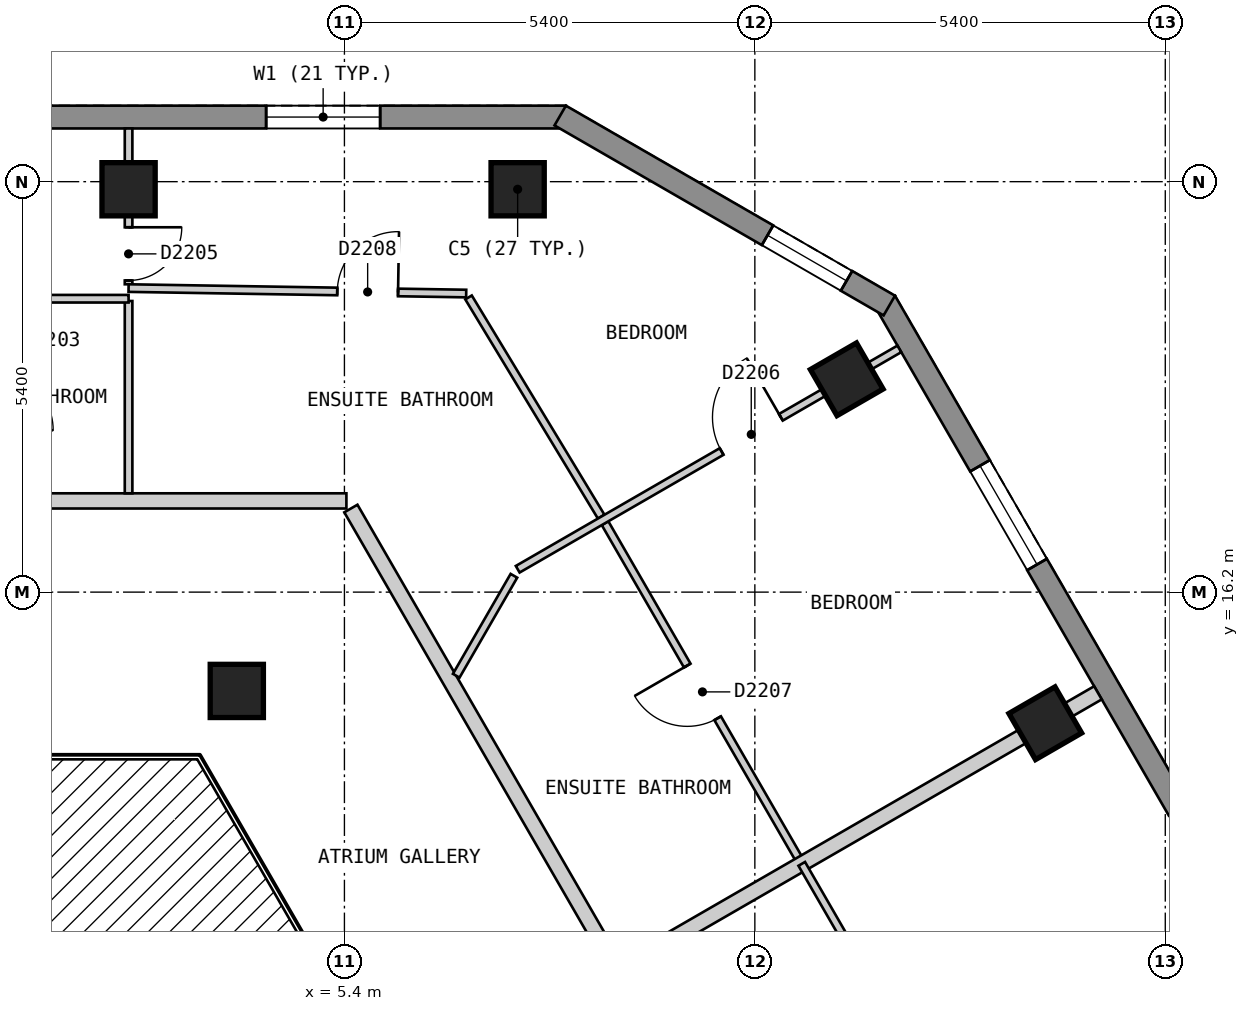
"""IFC4 building model, lengths in metres.
Left out: names, types, materials, properties, quantities, classifications, styles, units other than length and angle.
Written with IfcOpenShell. Run it as: python <this file> out.ifc"""

import sys

from ifc_helpers import new_model, si_unit, direction, frame, frame_2d, origin, origin_2d, place, context, subcontext, project, spatial, polyline, rectangle, outline, extrude, element, fill, save


model = new_model("IFC4")
c1 = context("Model", 3, precision=1e-05, world=origin(), true_north=direction((0.0, 1.0)))
c2 = subcontext(c1, "Body", "Model", "MODEL_VIEW")
j1 = project(units=[si_unit("LENGTHUNIT", "METRE"), si_unit("PLANEANGLEUNIT", "RADIAN")], contexts=[c1])
p1 = place(None, origin())
s1 = spatial("IfcSite", under=j1, at=p1, CompositionType="ELEMENT")
p2 = place(p1, origin())
s2 = spatial("IfcBuilding", under=s1, at=p2, CompositionType="ELEMENT")
p3 = place(p2, frame((0.0, 0.0, 229.8)))
s3 = spatial("IfcBuildingStorey", under=s2, at=p3, CompositionType="ELEMENT", Elevation=229.8)
for number, where, z_axis, x_axis in (
    (1, (7.679, 21.5, 0.0), (0.0, 0.0, 1.0), (-1.0, 0.0, 0.0)),
    (2, (2.56, 21.5, 0.0), (0.0, 0.0, 1.0), (-1.0, 0.0, 0.0)),
    (3, (14.621, 14.475, 0.0), (0.0, 0.0, 1.0), (-0.5, 0.866, 0.0)),
    (4, (12.009, 19.0, 0.0), (0.0, 0.0, 1.0), (-0.5, 0.866, 0.0)),
    (5, (3.984, 14.9, 0.0), (0.0, 0.0, 1.0), (1.0, 0.0, 0.0)),
):
    element("IfcColumn", number, at=place(p3, frame(where, z_axis=z_axis, x_axis=x_axis)), inside=s3, PredefinedType="COLUMN", context=c2, shape_type="SweptSolid", body=[
        extrude(rectangle(XDim=0.7, YDim=0.7, at=origin_2d()), origin(), (0.0, 0.0, 1.0), 3.0),
    ])
p4 = place(p3, frame((8.314, 22.45, 0.0), z_axis=(0.0, 0.0, 1.0), x_axis=(-1.0, 0.0, 0.0)))
e6 = element("IfcWall", 6, at=p4, inside=s3, PredefinedType="SOLIDWALL", context=c2, shape_type="SweptSolid", body=[
    extrude(outline(polyline([(0.0, -0.15), (16.628, -0.15), (16.548, 0.15), (0.08, 0.15), (0.0, -0.15)])), origin(), (0.0, 0.0, 1.0), 2.7),
])
p5 = place(p4, frame((2.444, 0.0, 0.15)))
e7 = element("IfcOpeningElement", 7, at=p5, cuts=e6, PredefinedType="OPENING", context=c2, shape_type="SweptSolid", body=[
    extrude(rectangle(XDim=1.5, YDim=2.1, at=frame_2d((0.75, 1.05))), frame((0.0, 0.16, 0.0), z_axis=(0.0, -1.0, 0.0), x_axis=(1.0, 0.0, 0.0)), (0.0, 0.0, 1.0), 0.32),
])
p6 = place(p4, frame((7.564, 0.0, 0.15)))
e8 = element("IfcOpeningElement", 8, at=p6, cuts=e6, PredefinedType="OPENING", context=c2, shape_type="SweptSolid", body=[
    extrude(rectangle(XDim=1.5, YDim=2.1, at=frame_2d((0.75, 1.05))), frame((0.0, 0.16, 0.0), z_axis=(0.0, -1.0, 0.0), x_axis=(1.0, 0.0, 0.0)), (0.0, 0.0, 1.0), 0.32),
])
p7 = place(p4, frame((12.683, 0.0, 0.15)))
e9 = element("IfcOpeningElement", 9, at=p7, cuts=e6, PredefinedType="OPENING", context=c2, shape_type="SweptSolid", body=[
    extrude(rectangle(XDim=1.5, YDim=2.1, at=frame_2d((0.75, 1.05))), frame((0.0, 0.16, 0.0), z_axis=(0.0, -1.0, 0.0), x_axis=(1.0, 0.0, 0.0)), (0.0, 0.0, 1.0), 0.32),
])
p8 = place(p3, frame((23.599, 0.825, 0.0), z_axis=(0.0, 0.0, 1.0), x_axis=(-0.500003656944, 0.866023292436, 0.0)))
e10 = element("IfcWall", 10, at=p8, inside=s3, PredefinedType="SOLIDWALL", context=c2, shape_type="SweptSolid", body=[
    extrude(outline(polyline([(0.0, -0.15), (22.17, -0.15), (22.09, 0.15), (0.08, 0.15), (0.0, -0.15)])), origin(), (0.0, 0.0, 1.0), 2.7),
])
p9 = place(p8, frame((2.497, 0.0, 0.15)))
e11 = element("IfcOpeningElement", 11, at=p9, cuts=e10, PredefinedType="OPENING", context=c2, shape_type="SweptSolid", body=[
    extrude(rectangle(XDim=1.5, YDim=2.1, at=frame_2d((0.75, 1.05))), frame((0.0, 0.16, 0.0), z_axis=(0.0, -1.0, 0.0), x_axis=(1.0, 0.0, 0.0)), (0.0, 0.0, 1.0), 0.32),
])
p10 = place(p8, frame((7.723, 0.0, 0.15)))
e12 = element("IfcOpeningElement", 12, at=p10, cuts=e10, PredefinedType="OPENING", context=c2, shape_type="SweptSolid", body=[
    extrude(rectangle(XDim=1.5, YDim=2.1, at=frame_2d((0.75, 1.05))), frame((0.0, 0.16, 0.0), z_axis=(0.0, -1.0, 0.0), x_axis=(1.0, 0.0, 0.0)), (0.0, 0.0, 1.0), 0.32),
])
p11 = place(p8, frame((12.948, 0.0, 0.15)))
e13 = element("IfcOpeningElement", 13, at=p11, cuts=e10, PredefinedType="OPENING", context=c2, shape_type="SweptSolid", body=[
    extrude(rectangle(XDim=1.5, YDim=2.1, at=frame_2d((0.75, 1.05))), frame((0.0, 0.16, 0.0), z_axis=(0.0, -1.0, 0.0), x_axis=(1.0, 0.0, 0.0)), (0.0, 0.0, 1.0), 0.32),
])
p12 = place(p8, frame((18.173, 0.0, 0.15)))
e14 = element("IfcOpeningElement", 14, at=p12, cuts=e10, PredefinedType="OPENING", context=c2, shape_type="SweptSolid", body=[
    extrude(rectangle(XDim=1.5, YDim=2.1, at=frame_2d((0.75, 1.05))), frame((0.0, 0.16, 0.0), z_axis=(0.0, -1.0, 0.0), x_axis=(1.0, 0.0, 0.0)), (0.0, 0.0, 1.0), 0.32),
])
p13 = place(p3, frame((12.569, 19.97, 0.0), z_axis=(0.0, 0.0, 1.0), x_axis=(-0.866022959057, 0.500004234368, 0.0)))
e15 = element("IfcWall", 15, at=p13, inside=s3, PredefinedType="SOLIDWALL", context=c2, shape_type="SweptSolid", body=[
    extrude(outline(polyline([(0.0, -0.15), (5.0, -0.15), (4.92, 0.15), (0.08, 0.15), (0.0, -0.15)])), origin(), (0.0, 0.0, 1.0), 2.7),
])
p14 = place(p13, frame((0.65, 0.0, 0.15)))
e16 = element("IfcOpeningElement", 16, at=p14, cuts=e15, PredefinedType="OPENING", context=c2, shape_type="SweptSolid", body=[
    extrude(rectangle(XDim=1.2, YDim=2.1, at=frame_2d((0.6, 1.05))), frame((0.0, 0.16, 0.0), z_axis=(0.0, -1.0, 0.0), x_axis=(1.0, 0.0, 0.0)), (0.0, 0.0, 1.0), 0.32),
])
p15 = place(p3, frame((5.485, 17.3, 0.0), z_axis=(0.0, 0.0, 1.0), x_axis=(0.500017221754, -0.866015460572, 0.0)))
e17 = element("IfcWall", 17, at=p15, inside=s3, PredefinedType="PARTITIONING", context=c2, shape_type="SweptSolid", body=[
    extrude(rectangle(XDim=10.468, YDim=0.2, at=frame_2d((5.234, 0.0))), origin(), (0.0, 0.0, 1.0), 2.7),
])
p16 = place(p15, frame((9.092, 0.0, 0.0)))
e18 = element("IfcOpeningElement", 18, at=p16, cuts=e17, PredefinedType="OPENING", context=c2, shape_type="SweptSolid", body=[
    extrude(rectangle(XDim=1.0, YDim=2.1, at=frame_2d((0.5, 1.05))), frame((0.0, 0.11, 0.0), z_axis=(0.0, -1.0, 0.0), x_axis=(1.0, 0.0, 0.0)), (0.0, 0.0, 1.0), 0.22),
])
p17 = place(p3, frame((-5.311, 17.4, 0.0), z_axis=(0.0, 0.0, 1.0), x_axis=(1.0, 0.0, 0.0)))
e19 = element("IfcWall", 19, at=p17, inside=s3, PredefinedType="PARTITIONING", context=c2, shape_type="SweptSolid", body=[
    extrude(rectangle(XDim=10.737, YDim=0.2, at=frame_2d((5.369, 0.0))), origin(), (0.0, 0.0, 1.0), 2.7),
])
p18 = place(p17, frame((4.812, 0.0, 0.0)))
e20 = element("IfcOpeningElement", 20, at=p18, cuts=e19, PredefinedType="OPENING", context=c2, shape_type="SweptSolid", body=[
    extrude(rectangle(XDim=1.0, YDim=2.1, at=frame_2d((0.5, 1.05))), frame((0.0, 0.11, 0.0), z_axis=(0.0, -1.0, 0.0), x_axis=(1.0, 0.0, 0.0)), (0.0, 0.0, 1.0), 0.22),
])
p19 = place(p3, frame((7.033, 20.077, 0.0), z_axis=(0.0, 0.0, 1.0), x_axis=(0.517730137343, -0.855543981854, 0.0)))
e21 = element("IfcWall", 21, at=p19, inside=s3, PredefinedType="PARTITIONING", context=c2, shape_type="SweptSolid", body=[
    extrude(rectangle(XDim=3.371, YDim=0.1, at=frame_2d((1.685, 0.0))), origin(), (0.0, 0.0, 1.0), 2.7),
])
p20 = place(p3, frame((8.829, 17.107, 0.0), z_axis=(0.0, 0.0, 1.0), x_axis=(0.500035512416, -0.866004899711, 0.0)))
e22 = element("IfcWall", 22, at=p20, inside=s3, PredefinedType="PARTITIONING", context=c2, shape_type="SweptSolid", body=[
    extrude(rectangle(XDim=5.175, YDim=0.1, at=frame_2d((2.588, 0.0))), origin(), (0.0, 0.0, 1.0), 2.7),
])
p21 = place(p20, frame((2.163, 0.0, 0.0)))
e23 = element("IfcOpeningElement", 23, at=p21, cuts=e22, PredefinedType="OPENING", context=c2, shape_type="SweptSolid", body=[
    extrude(rectangle(XDim=0.8, YDim=2.1, at=frame_2d((0.4, 1.05))), frame((0.0, 0.06, 0.0), z_axis=(0.0, -1.0, 0.0), x_axis=(1.0, 0.0, 0.0)), (0.0, 0.0, 1.0), 0.12),
])
p22 = place(p3, frame((2.56, 22.3, 0.0), z_axis=(0.0, 0.0, 1.0), x_axis=(0.0, -1.0, 0.0)))
e24 = element("IfcWall", 24, at=p22, inside=s3, PredefinedType="PARTITIONING", context=c2, shape_type="SweptSolid", body=[
    extrude(rectangle(XDim=2.05, YDim=0.1, at=frame_2d((1.025, 0.0))), origin(), (0.0, 0.0, 1.0), 2.7),
])
p23 = place(p22, frame((1.3, 0.0, 0.0)))
e25 = element("IfcOpeningElement", 25, at=p23, cuts=e24, PredefinedType="OPENING", context=c2, shape_type="SweptSolid", body=[
    extrude(rectangle(XDim=0.7, YDim=2.1, at=frame_2d((0.35, 1.05))), frame((0.0, 0.06, 0.0), z_axis=(0.0, -1.0, 0.0), x_axis=(1.0, 0.0, 0.0)), (0.0, 0.0, 1.0), 0.12),
])
p24 = place(p3, frame((2.56, 20.03, 0.0), z_axis=(0.0, 0.0, 1.0), x_axis=(0.0, -1.0, 0.0)))
e26 = element("IfcWall", 26, at=p24, inside=s3, PredefinedType="PARTITIONING", context=c2, shape_type="SweptSolid", body=[
    extrude(rectangle(XDim=2.53, YDim=0.1, at=frame_2d((1.265, 0.0))), origin(), (0.0, 0.0, 1.0), 2.7),
])
p25 = place(p3, frame((2.56, 20.2, 0.0), z_axis=(0.0, 0.0, 1.0), x_axis=(0.999868576801, -0.016212005615, 0.0)))
e27 = element("IfcWall", 27, at=p25, inside=s3, PredefinedType="PARTITIONING", context=c2, shape_type="SweptSolid", body=[
    extrude(rectangle(XDim=4.442, YDim=0.1, at=frame_2d((2.221, 0.0))), origin(), (0.0, 0.0, 1.0), 2.7),
])
p26 = place(p25, frame((2.746, 0.0, 0.0)))
e28 = element("IfcOpeningElement", 28, at=p26, cuts=e27, PredefinedType="OPENING", context=c2, shape_type="SweptSolid", body=[
    extrude(rectangle(XDim=0.8, YDim=2.1, at=frame_2d((0.4, 1.05))), frame((0.0, 0.06, 0.0), z_axis=(0.0, -1.0, 0.0), x_axis=(1.0, 0.0, 0.0)), (0.0, 0.0, 1.0), 0.12),
])
p27 = place(p3, frame((-0.716, 20.06, 0.0), z_axis=(0.0, 0.0, 1.0), x_axis=(1.0, 0.0, 0.0)))
e29 = element("IfcWall", 29, at=p27, inside=s3, PredefinedType="PARTITIONING", context=c2, shape_type="SweptSolid", body=[
    extrude(rectangle(XDim=3.276, YDim=0.1, at=frame_2d((1.638, 0.0))), origin(), (0.0, 0.0, 1.0), 2.7),
])
p28 = place(p3, frame((6.871, 15.1, 0.0), z_axis=(0.0, 0.0, 1.0), x_axis=(0.499805980977, 0.866137391745, 0.0)))
e30 = element("IfcWall", 30, at=p28, inside=s3, PredefinedType="PARTITIONING", context=c2, shape_type="SweptSolid", body=[
    extrude(rectangle(XDim=1.518, YDim=0.1, at=frame_2d((0.759, 0.0))), origin(), (0.0, 0.0, 1.0), 2.7),
])
p29 = place(p3, frame((7.68, 16.501, 0.0), z_axis=(0.0, 0.0, 1.0), x_axis=(0.86602149507, 0.500006770031, 0.0)))
e31 = element("IfcWall", 31, at=p29, inside=s3, PredefinedType="PARTITIONING", context=c2, shape_type="SweptSolid", body=[
    extrude(rectangle(XDim=5.798, YDim=0.1, at=frame_2d((2.899, 0.0))), origin(), (0.0, 0.0, 1.0), 2.7),
])
p30 = place(p29, frame((3.098, 0.0, 0.0)))
e32 = element("IfcOpeningElement", 32, at=p30, cuts=e31, PredefinedType="OPENING", context=c2, shape_type="SweptSolid", body=[
    extrude(rectangle(XDim=0.9, YDim=2.1, at=frame_2d((0.45, 1.05))), frame((0.0, 0.06, 0.0), z_axis=(0.0, -1.0, 0.0), x_axis=(1.0, 0.0, 0.0)), (0.0, 0.0, 1.0), 0.12),
])
p31 = place(p3, frame((9.079, 11.275, 0.0), z_axis=(0.0, 0.0, 1.0), x_axis=(0.866001485781, 0.500041424909, 0.0)))
e33 = element("IfcWall", 33, at=p31, inside=s3, PredefinedType="PARTITIONING", context=c2, shape_type="SweptSolid", body=[
    extrude(rectangle(XDim=7.2, YDim=0.2, at=frame_2d((3.6, 0.0))), origin(), (0.0, 0.0, 1.0), 2.7),
])
p32 = place(p3, frame((11.417, 12.625, 0.0), z_axis=(0.0, 0.0, 1.0), x_axis=(0.500055103712, -0.865993587304, 0.0)))
e34 = element("IfcWall", 34, at=p32, inside=s3, PredefinedType="PARTITIONING", context=c2, shape_type="SweptSolid", body=[
    extrude(rectangle(XDim=2.944, YDim=0.1, at=frame_2d((1.472, 0.0))), origin(), (0.0, 0.0, 1.0), 2.7),
])
p33 = place(p5, origin())
e35 = element("IfcWindow", 35, at=p33, inside=s3, PartitioningType="SINGLE_PANEL", PredefinedType="WINDOW", context=c2, shape_type="SweptSolid", body=[
    extrude(rectangle(XDim=1.5, YDim=2.1, at=frame_2d((0.75, 1.05))), frame((0.0, 0.03, 0.0), z_axis=(0.0, -1.0, 0.0), x_axis=(1.0, 0.0, 0.0)), (0.0, 0.0, 1.0), 0.06),
])
fill(e7, e35)
p34 = place(p12, origin())
e36 = element("IfcWindow", 36, at=p34, inside=s3, PartitioningType="SINGLE_PANEL", PredefinedType="WINDOW", context=c2, shape_type="SweptSolid", body=[
    extrude(rectangle(XDim=1.5, YDim=2.1, at=frame_2d((0.75, 1.05))), frame((0.0, 0.03, 0.0), z_axis=(0.0, -1.0, 0.0), x_axis=(1.0, 0.0, 0.0)), (0.0, 0.0, 1.0), 0.06),
])
fill(e14, e36)
p35 = place(p14, origin())
e37 = element("IfcWindow", 37, at=p35, inside=s3, PartitioningType="SINGLE_PANEL", PredefinedType="WINDOW", context=c2, shape_type="SweptSolid", body=[
    extrude(rectangle(XDim=1.2, YDim=2.1, at=frame_2d((0.6, 1.05))), frame((0.0, 0.03, 0.0), z_axis=(0.0, -1.0, 0.0), x_axis=(1.0, 0.0, 0.0)), (0.0, 0.0, 1.0), 0.06),
])
fill(e16, e37)
p36 = place(p23, origin())
e38 = element("IfcDoor", 38, at=p36, inside=s3, OperationType="SINGLE_SWING_LEFT", PredefinedType="DOOR", context=c2, shape_type="SweptSolid", body=[
    extrude(rectangle(XDim=0.7, YDim=2.1, at=frame_2d((0.35, 1.05))), frame((0.0, 0.025, 0.0), z_axis=(0.0, -1.0, 0.0), x_axis=(1.0, 0.0, 0.0)), (0.0, 0.0, 1.0), 0.05),
])
fill(e25, e38)
p37 = place(p30, origin())
e39 = element("IfcDoor", 39, at=p37, inside=s3, OperationType="SINGLE_SWING_RIGHT", PredefinedType="DOOR", context=c2, shape_type="SweptSolid", body=[
    extrude(rectangle(XDim=0.9, YDim=2.1, at=frame_2d((0.45, 1.05))), frame((0.0, 0.025, 0.0), z_axis=(0.0, -1.0, 0.0), x_axis=(1.0, 0.0, 0.0)), (0.0, 0.0, 1.0), 0.05),
])
fill(e32, e39)
p38 = place(p21, origin())
e40 = element("IfcDoor", 40, at=p38, inside=s3, OperationType="SINGLE_SWING_LEFT", PredefinedType="DOOR", context=c2, shape_type="SweptSolid", body=[
    extrude(rectangle(XDim=0.8, YDim=2.1, at=frame_2d((0.4, 1.05))), frame((0.0, 0.025, 0.0), z_axis=(0.0, -1.0, 0.0), x_axis=(1.0, 0.0, 0.0)), (0.0, 0.0, 1.0), 0.05),
])
fill(e23, e40)
p39 = place(p26, origin())
e41 = element("IfcDoor", 41, at=p39, inside=s3, OperationType="SINGLE_SWING_RIGHT", PredefinedType="DOOR", context=c2, shape_type="SweptSolid", body=[
    extrude(rectangle(XDim=0.8, YDim=2.1, at=frame_2d((0.4, 1.05))), frame((0.0, 0.025, 0.0), z_axis=(0.0, -1.0, 0.0), x_axis=(1.0, 0.0, 0.0)), (0.0, 0.0, 1.0), 0.05),
])
fill(e28, e41)
save(model, sys.argv[1])
